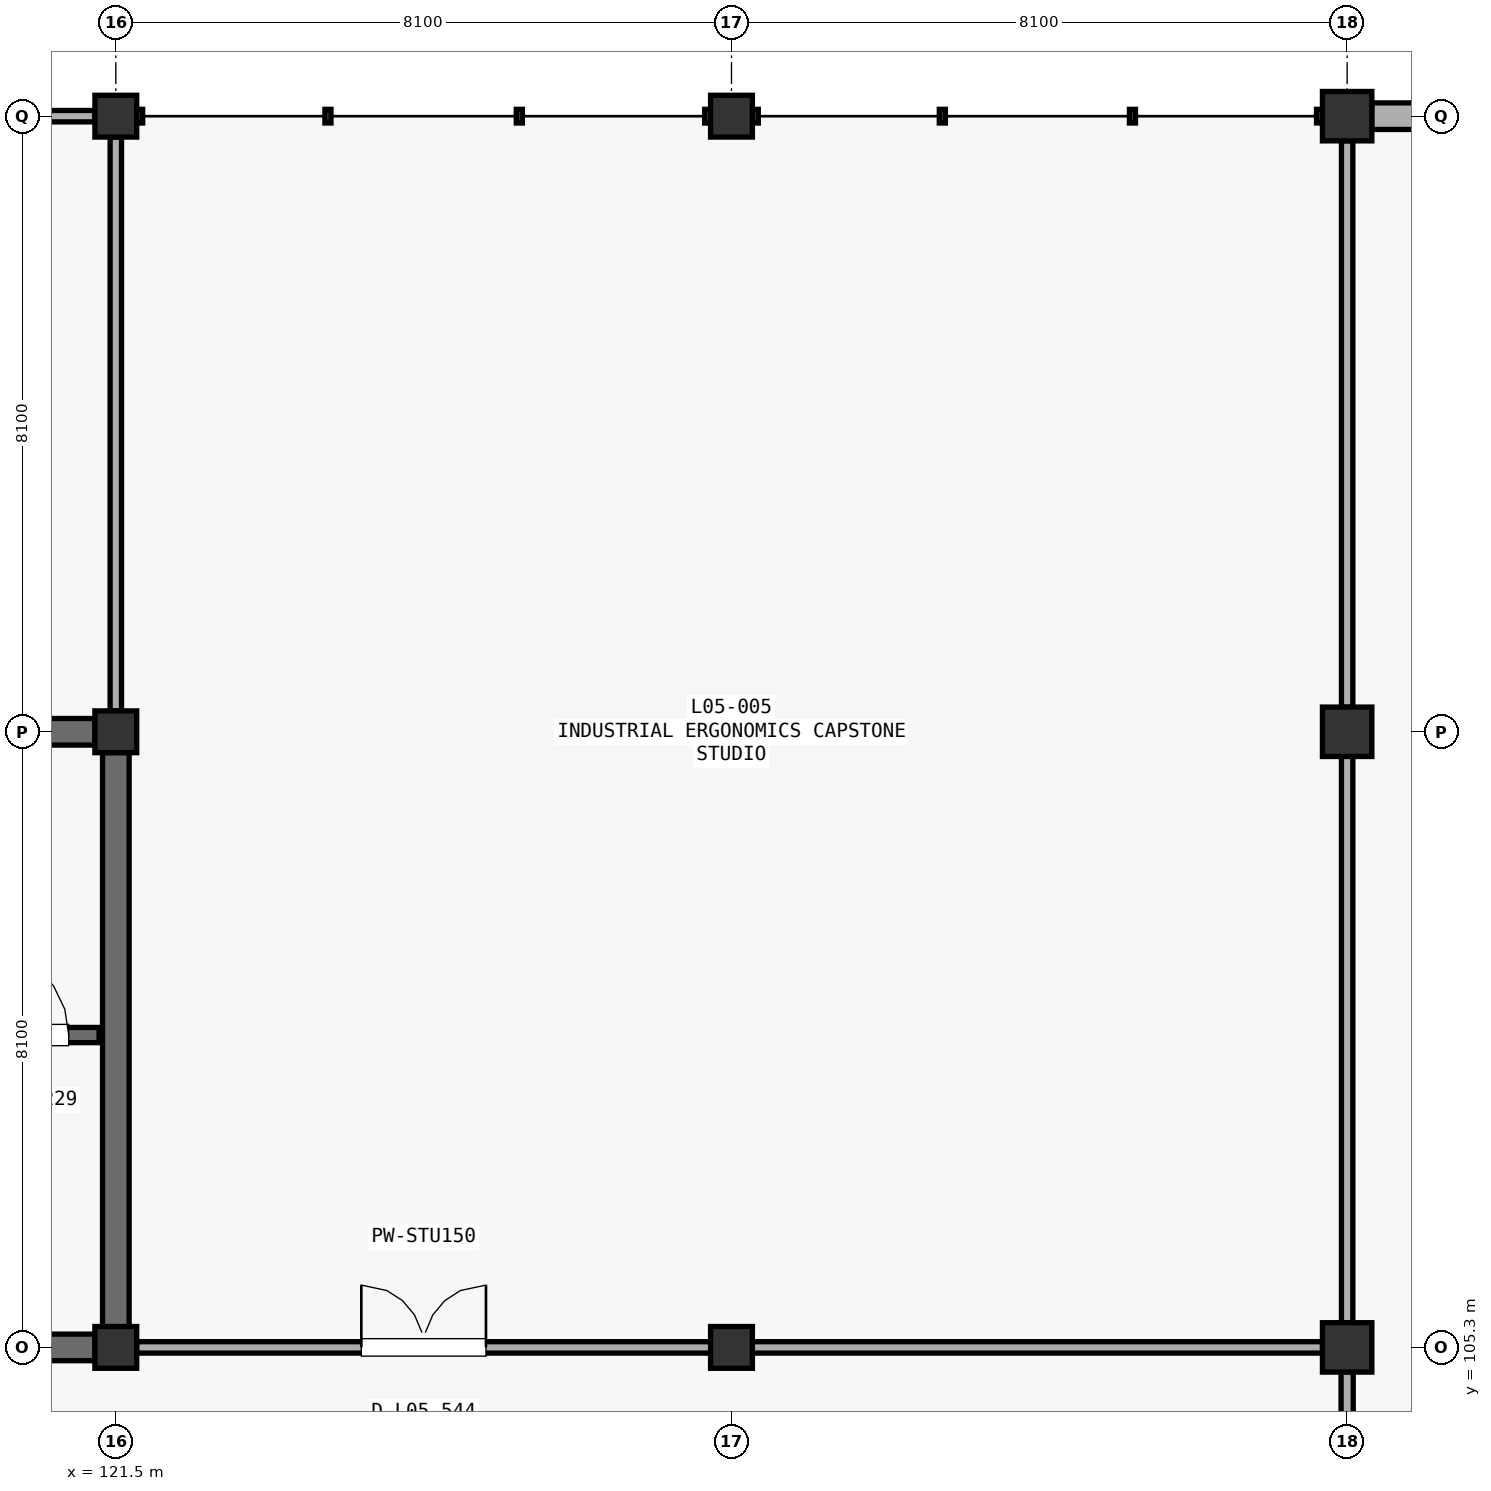
"""IFC4 building model, lengths in metres.
Left out: names, types, materials, properties, quantities, classifications, styles, units other than length and angle.
Written with IfcOpenShell. Run it as: python <this file> out.ifc"""

import sys

from ifc_helpers import new_model, si_unit, direction, frame, frame_2d, origin, origin_2d, place, context, subcontext, project, spatial, rectangle, extrude, element, fill, save


model = new_model("IFC4")
c1 = context("Model", 3, precision=1e-05, world=origin(), true_north=direction((0.0, 1.0)))
c2 = subcontext(c1, "Body", "Model", "MODEL_VIEW")
j1 = project(units=[si_unit("LENGTHUNIT", "METRE"), si_unit("PLANEANGLEUNIT", "RADIAN")], contexts=[c1])
p1 = place(None, origin())
s1 = spatial("IfcSite", under=j1, at=p1, CompositionType="ELEMENT")
p2 = place(p1, origin())
s2 = spatial("IfcBuilding", under=s1, at=p2, CompositionType="ELEMENT")
p3 = place(p2, frame((0.0, 0.0, 22.95)))
s3 = spatial("IfcBuildingStorey", under=s2, at=p3, CompositionType="ELEMENT", Elevation=22.95)
for number, where, z_axis, x_axis in (
    (1, (121.5, 105.3, 0.0), (0.0, 0.0, 1.0), (1.0, 0.0, 0.0)),
    (2, (121.5, 113.4, 0.0), (0.0, 0.0, 1.0), (1.0, 0.0, 0.0)),
    (3, (121.5, 121.5, 0.0), (0.0, 0.0, 1.0), (1.0, 0.0, 0.0)),
    (4, (129.6, 105.3, 0.0), (0.0, 0.0, 1.0), (1.0, 0.0, 0.0)),
    (5, (129.6, 113.4, 0.0), (0.0, 0.0, 1.0), (1.0, 0.0, 0.0)),
    (6, (129.6, 121.5, 0.0), (0.0, 0.0, 1.0), (1.0, 0.0, 0.0)),
):
    element("IfcColumn", number, at=place(p3, frame(where, z_axis=z_axis, x_axis=x_axis)), inside=s3, PredefinedType="COLUMN", context=c2, shape_type="SweptSolid", body=[
        extrude(rectangle(XDim=0.55, YDim=0.55, at=origin_2d()), origin(), (0.0, 0.0, 1.0), 4.42),
    ])
for number, where, z_axis, x_axis in (
    (7, (137.7, 105.3, 0.0), (0.0, 0.0, 1.0), (1.0, 0.0, 0.0)),
    (8, (137.7, 113.4, 0.0), (0.0, 0.0, 1.0), (1.0, 0.0, 0.0)),
    (9, (137.7, 121.5, 0.0), (0.0, 0.0, 1.0), (1.0, 0.0, 0.0)),
):
    element("IfcColumn", number, at=place(p3, frame(where, z_axis=z_axis, x_axis=x_axis)), inside=s3, PredefinedType="COLUMN", context=c2, shape_type="SweptSolid", body=[
        extrude(rectangle(XDim=0.65, YDim=0.65, at=origin_2d()), origin(), (0.0, 0.0, 1.0), 4.42),
    ])
p4 = place(p3, frame((138.023, 121.5, 0.0), z_axis=(0.0, 0.0, 1.0), x_axis=(1.0, 0.0, 0.0)))
e10 = element("IfcWall", 10, at=p4, inside=s3, PredefinedType="STANDARD", context=c2, shape_type="SweptSolid", body=[
    extrude(rectangle(XDim=7.454, YDim=0.35, at=frame_2d((3.727, 0.0))), origin(), (0.0, 0.0, 1.0), 3.312),
])
p5 = place(p4, frame((2.602, 0.0, 0.85)))
e11 = element("IfcOpeningElement", 11, at=p5, cuts=e10, PredefinedType="OPENING", context=c2, shape_type="SweptSolid", body=[
    extrude(rectangle(XDim=2.25, YDim=1.75, at=frame_2d((1.125, 0.875))), frame((0.0, 0.185, 0.0), z_axis=(0.0, -1.0, 0.0), x_axis=(1.0, 0.0, 0.0)), (0.0, 0.0, 1.0), 0.37),
])
for number, where, z_axis, x_axis in (
    (12, (113.673, 113.4, 0.0), (0.0, 0.0, 1.0), (1.0, 0.0, 0.0)),
    (13, (121.5, 105.573, 0.0), (0.0, 0.0, 1.0), (0.0, 1.0, 0.0)),
):
    element("IfcWall", number, at=place(p3, frame(where, z_axis=z_axis, x_axis=x_axis)), inside=s3, PredefinedType="SHEAR", context=c2, shape_type="SweptSolid", body=[
        extrude(rectangle(XDim=7.554, YDim=0.35, at=frame_2d((3.777, 0.0))), origin(), (0.0, 0.0, 1.0), 4.162),
    ])
p6 = place(p3, frame((113.673, 105.3, 0.0), z_axis=(0.0, 0.0, 1.0), x_axis=(1.0, 0.0, 0.0)))
e14 = element("IfcWall", 14, at=p6, inside=s3, PredefinedType="SHEAR", context=c2, shape_type="SweptSolid", body=[
    extrude(rectangle(XDim=7.554, YDim=0.35, at=frame_2d((3.777, 0.0))), origin(), (0.0, 0.0, 1.0), 4.162),
])
p7 = place(p6, frame((5.304, 0.0, 0.0)))
e15 = element("IfcOpeningElement", 15, at=p7, cuts=e14, PredefinedType="OPENING", context=c2, shape_type="SweptSolid", body=[
    extrude(rectangle(XDim=1.2, YDim=2.2, at=frame_2d((0.6, 1.1))), frame((0.0, 0.185, 0.0), z_axis=(0.0, -1.0, 0.0), x_axis=(1.0, 0.0, 0.0)), (0.0, 0.0, 1.0), 0.37),
])
p8 = place(p3, frame((113.62, 109.41, 0.0), z_axis=(0.0, 0.0, 1.0), x_axis=(1.0, 0.0, 0.0)))
e16 = element("IfcWall", 16, at=p8, inside=s3, PredefinedType="SHEAR", context=c2, shape_type="SweptSolid", body=[
    extrude(rectangle(XDim=7.66, YDim=0.2, at=frame_2d((3.83, 0.0))), origin(), (0.0, 0.0, 1.0), 4.162),
])
p9 = place(p8, frame((6.11, 0.0, 0.0)))
e17 = element("IfcOpeningElement", 17, at=p9, cuts=e16, PredefinedType="OPENING", context=c2, shape_type="SweptSolid", body=[
    extrude(rectangle(XDim=1.15, YDim=2.2, at=frame_2d((0.575, 1.1))), frame((0.0, 0.11, 0.0), z_axis=(0.0, -1.0, 0.0), x_axis=(1.0, 0.0, 0.0)), (0.0, 0.0, 1.0), 0.22),
])
p10 = place(p3, frame((121.773, 105.3, 0.0), z_axis=(0.0, 0.0, 1.0), x_axis=(1.0, 0.0, 0.0)))
e18 = element("IfcWall", 18, at=p10, inside=s3, PredefinedType="PARTITIONING", context=c2, shape_type="SweptSolid", body=[
    extrude(rectangle(XDim=7.554, YDim=0.15, at=frame_2d((3.777, 0.0))), origin(), (0.0, 0.0, 1.0), 3.212),
])
p11 = place(p10, frame((2.957, 0.0, 0.0)))
e19 = element("IfcOpeningElement", 19, at=p11, cuts=e18, PredefinedType="OPENING", context=c2, shape_type="SweptSolid", body=[
    extrude(rectangle(XDim=1.64, YDim=2.25, at=frame_2d((0.82, 1.125))), frame((0.0, 0.085, 0.0), z_axis=(0.0, -1.0, 0.0), x_axis=(1.0, 0.0, 0.0)), (0.0, 0.0, 1.0), 0.17),
])
p12 = place(p3, frame((129.873, 105.3, 0.0), z_axis=(0.0, 0.0, 1.0), x_axis=(1.0, 0.0, 0.0)))
e20 = element("IfcWall", 20, at=p12, inside=s3, PredefinedType="PARTITIONING", context=c2, shape_type="SweptSolid", body=[
    extrude(rectangle(XDim=7.504, YDim=0.15, at=frame_2d((3.752, 0.0))), origin(), (0.0, 0.0, 1.0), 3.412),
])
p13 = place(p3, frame((137.7, 105.623, 0.0), z_axis=(0.0, 0.0, 1.0), x_axis=(0.0, 1.0, 0.0)))
e21 = element("IfcWall", 21, at=p13, inside=s3, PredefinedType="PARTITIONING", context=c2, shape_type="SweptSolid", body=[
    extrude(rectangle(XDim=7.454, YDim=0.15, at=frame_2d((3.727, 0.0))), origin(), (0.0, 0.0, 1.0), 3.312),
])
p14 = place(p3, frame((137.7, 113.723, 0.0), z_axis=(0.0, 0.0, 1.0), x_axis=(0.0, 1.0, 0.0)))
e22 = element("IfcWall", 22, at=p14, inside=s3, PredefinedType="PARTITIONING", context=c2, shape_type="SweptSolid", body=[
    extrude(rectangle(XDim=7.454, YDim=0.15, at=frame_2d((3.727, 0.0))), origin(), (0.0, 0.0, 1.0), 3.212),
])
p15 = place(p3, frame((121.5, 113.673, 0.0), z_axis=(0.0, 0.0, 1.0), x_axis=(0.0, 1.0, 0.0)))
e23 = element("IfcWall", 23, at=p15, inside=s3, PredefinedType="PARTITIONING", context=c2, shape_type="SweptSolid", body=[
    extrude(rectangle(XDim=7.554, YDim=0.15, at=frame_2d((3.777, 0.0))), origin(), (0.0, 0.0, 1.0), 3.412),
])
p16 = place(p3, frame((137.7, 97.523, 0.0), z_axis=(0.0, 0.0, 1.0), x_axis=(0.0, 1.0, 0.0)))
e24 = element("IfcWall", 24, at=p16, inside=s3, PredefinedType="PARTITIONING", context=c2, shape_type="SweptSolid", body=[
    extrude(rectangle(XDim=7.454, YDim=0.16, at=frame_2d((3.727, 0.0))), origin(), (0.0, 0.0, 1.0), 3.562),
])
p17 = place(p3, frame((113.673, 121.5, 0.0), z_axis=(0.0, 0.0, 1.0), x_axis=(1.0, 0.0, 0.0)))
e25 = element("IfcWall", 25, at=p17, inside=s3, PredefinedType="PARTITIONING", context=c2, shape_type="SweptSolid", body=[
    extrude(rectangle(XDim=7.554, YDim=0.15, at=frame_2d((3.777, 0.0))), origin(), (0.0, 0.0, 1.0), 3.412),
])
p18 = place(p9, origin())
e26 = element("IfcDoor", 26, at=p18, inside=s3, OperationType="SINGLE_SWING_LEFT", PredefinedType="DOOR", context=c2, shape_type="SweptSolid", body=[
    extrude(rectangle(XDim=1.15, YDim=2.2, at=frame_2d((0.575, 1.1))), frame((0.0, 0.025, 0.0), z_axis=(0.0, -1.0, 0.0), x_axis=(1.0, 0.0, 0.0)), (0.0, 0.0, 1.0), 0.05),
])
fill(e17, e26)
p19 = place(p11, origin())
e27 = element("IfcDoor", 27, at=p19, inside=s3, OperationType="DOUBLE_SWING_LEFT", PredefinedType="DOOR", context=c2, shape_type="SweptSolid", body=[
    extrude(rectangle(XDim=1.64, YDim=2.25, at=frame_2d((0.82, 1.125))), frame((0.0, 0.025, 0.0), z_axis=(0.0, -1.0, 0.0), x_axis=(1.0, 0.0, 0.0)), (0.0, 0.0, 1.0), 0.05),
])
fill(e19, e27)
save(model, sys.argv[1])
